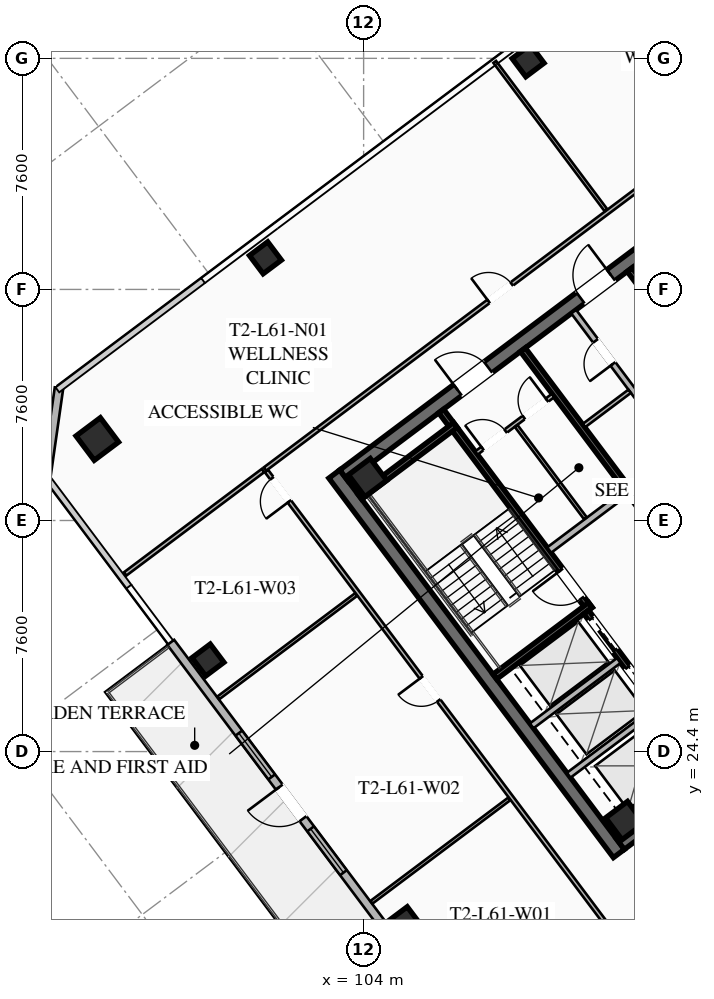
"""IFC4 building model, lengths in metres.
Left out: names, types, materials, properties, quantities, classifications, styles, units other than length and angle.
Written with IfcOpenShell. Run it as: python <this file> out.ifc"""

import sys

from ifc_helpers import new_model, si_unit, direction, frame, frame_2d, origin, origin_2d, place, context, subcontext, project, spatial, rectangle, hollow_rectangle, extrude, element, fill, save


model = new_model("IFC4")
c1 = context("Model", 3, precision=1e-05, world=origin(), true_north=direction((0.0, 1.0)))
c2 = subcontext(c1, "Body", "Model", "MODEL_VIEW")
j1 = project(units=[si_unit("LENGTHUNIT", "METRE"), si_unit("PLANEANGLEUNIT", "RADIAN")], contexts=[c1])
p1 = place(None, origin())
s1 = spatial("IfcSite", under=j1, at=p1, CompositionType="ELEMENT")
p2 = place(p1, origin())
s2 = spatial("IfcBuilding", under=s1, at=p2, CompositionType="ELEMENT")
p3 = place(p2, frame((0.0, 0.0, 225.5)))
s3 = spatial("IfcBuildingStorey", under=s2, at=p3, CompositionType="ELEMENT", Elevation=225.5)
p4 = place(p3, frame((112.396, 21.047, 0.0), z_axis=(0.0, 0.0, 1.0), x_axis=(-0.600005007985, 0.799996243986, 0.0)))
e1 = element("IfcWall", 1, at=p4, inside=s3, PredefinedType="SHEAR", context=c2, shape_type="SweptSolid", body=[
    extrude(rectangle(XDim=15.6, YDim=0.45, at=frame_2d((7.8, 0.0))), origin(), (0.0, 0.0, 1.0), 3.55),
])
p5 = place(p3, frame((124.649, 30.518, 0.0), z_axis=(0.0, 0.0, 1.0), x_axis=(-0.8, -0.6, 0.0)))
e2 = element("IfcWall", 2, at=p5, inside=s3, PredefinedType="SHEAR", context=c2, shape_type="SweptSolid", body=[
    extrude(rectangle(XDim=15.26, YDim=0.45, at=frame_2d((7.63, 0.0))), origin(), (0.0, 0.0, 1.0), 3.55),
])
p6 = place(p5, frame((9.33, 0.0, 0.0)))
e3 = element("IfcOpeningElement", 3, at=p6, cuts=e2, PredefinedType="OPENING", context=c2, shape_type="SweptSolid", body=[
    extrude(rectangle(XDim=1.25, YDim=2.25, at=frame_2d((0.625, 1.125))), frame((0.0, 0.235, 0.0), z_axis=(0.0, -1.0, 0.0), x_axis=(1.0, 0.0, 0.0)), (0.0, 0.0, 1.0), 0.47),
])
p7 = place(p5, frame((4.28, 0.0, 0.0)))
e4 = element("IfcOpeningElement", 4, at=p7, cuts=e2, PredefinedType="OPENING", context=c2, shape_type="SweptSolid", body=[
    extrude(rectangle(XDim=1.25, YDim=2.25, at=frame_2d((0.625, 1.125))), frame((0.0, 0.235, 0.0), z_axis=(0.0, -1.0, 0.0), x_axis=(1.0, 0.0, 0.0)), (0.0, 0.0, 1.0), 0.47),
])
p8 = place(p3, frame((103.351, 33.482, 0.0), z_axis=(0.0, 0.0, 1.0), x_axis=(0.8, 0.6, 0.0)))
e5 = element("IfcWall", 5, at=p8, inside=s3, PredefinedType="SHEAR", context=c2, shape_type="SweptSolid", body=[
    extrude(rectangle(XDim=15.26, YDim=0.45, at=frame_2d((7.63, 0.0))), origin(), (0.0, 0.0, 1.0), 3.55),
])
p9 = place(p8, frame((4.68, 0.0, 0.0)))
e6 = element("IfcOpeningElement", 6, at=p9, cuts=e5, PredefinedType="OPENING", context=c2, shape_type="SweptSolid", body=[
    extrude(rectangle(XDim=1.25, YDim=2.25, at=frame_2d((0.625, 1.125))), frame((0.0, 0.235, 0.0), z_axis=(0.0, -1.0, 0.0), x_axis=(1.0, 0.0, 0.0)), (0.0, 0.0, 1.0), 0.47),
])
p10 = place(p8, frame((9.73, 0.0, 0.0)))
e7 = element("IfcOpeningElement", 7, at=p10, cuts=e5, PredefinedType="OPENING", context=c2, shape_type="SweptSolid", body=[
    extrude(rectangle(XDim=1.25, YDim=2.25, at=frame_2d((0.625, 1.125))), frame((0.0, 0.235, 0.0), z_axis=(0.0, -1.0, 0.0), x_axis=(1.0, 0.0, 0.0)), (0.0, 0.0, 1.0), 0.47),
])
for number, where, z_axis, x_axis in (
    (8, (112.59, 22.13, 0.0), (0.0, 0.0, 1.0), (0.8, 0.6, 0.0)),
    (9, (104.13, 33.41, 0.0), (0.0, 0.0, 1.0), (0.8, 0.6, 0.0)),
):
    element("IfcColumn", number, at=place(p3, frame(where, z_axis=z_axis, x_axis=x_axis)), inside=s3, PredefinedType="COLUMN", context=c2, shape_type="SweptSolid", body=[
        extrude(hollow_rectangle(XDim=0.9, YDim=0.9, WallThickness=0.04, at=origin_2d()), origin(), (0.0, 0.0, 1.0), 3.37),
    ])
p11 = place(p3, frame((95.24, 34.68, 0.0), z_axis=(0.0, 0.0, 1.0), x_axis=(0.799999996291, 0.600000004945, 0.0)))
e10 = element("IfcColumn", 10, at=p11, inside=s3, PredefinedType="COLUMN", context=c2, shape_type="SweptSolid", body=[
    extrude(hollow_rectangle(XDim=1.0, YDim=1.0, WallThickness=0.04, at=origin_2d()), origin(), (0.0, 0.0, 1.0), 3.37),
])
for number, where, z_axis, x_axis in (
    (11, (109.41, 47.12, 0.0), (0.0, 0.0, 1.0), (0.8, 0.6, 0.0)),
    (12, (100.77, 40.64, 0.0), (0.0, 0.0, 1.0), (0.8, 0.6, 0.0)),
    (13, (98.88, 27.41, 0.0), (0.0, 0.0, 1.0), (0.8, 0.6, 0.0)),
    (14, (105.36, 18.77, 0.0), (0.0, 0.0, 1.0), (0.8, 0.6, 0.0)),
):
    element("IfcColumn", number, at=place(p3, frame(where, z_axis=z_axis, x_axis=x_axis)), inside=s3, PredefinedType="COLUMN", context=c2, shape_type="SweptSolid", body=[
        extrude(hollow_rectangle(XDim=0.75, YDim=0.75, WallThickness=0.032, at=origin_2d()), origin(), (0.0, 0.0, 1.0), 3.37),
    ])
p12 = place(p3, frame((105.576, 17.432, 0.0), z_axis=(0.0, 0.0, 1.0), x_axis=(-0.599994081423, 0.800004438899, 0.0)))
e15 = element("IfcWall", 15, at=p12, inside=s3, PredefinedType="SOLIDWALL", context=c2, shape_type="SweptSolid", body=[
    extrude(rectangle(XDim=13.2, YDim=0.28, at=frame_2d((6.6, 0.0))), origin(), (0.0, 0.0, 1.0), 3.37),
])
p13 = place(p12, frame((5.95, 0.0, 0.0)))
e16 = element("IfcOpeningElement", 16, at=p13, cuts=e15, PredefinedType="OPENING", context=c2, shape_type="SweptSolid", body=[
    extrude(rectangle(XDim=1.3, YDim=2.15, at=frame_2d((0.65, 1.075))), frame((0.0, 0.15, 0.0), z_axis=(0.0, -1.0, 0.0), x_axis=(1.0, 0.0, 0.0)), (0.0, 0.0, 1.0), 0.3),
])
p14 = place(p12, frame((3.732, 0.0, 0.85)))
e17 = element("IfcOpeningElement", 17, at=p14, cuts=e15, PredefinedType="OPENING", context=c2, shape_type="SweptSolid", body=[
    extrude(rectangle(XDim=1.8, YDim=1.92, at=frame_2d((0.9, 0.96))), frame((0.0, 0.15, 0.0), z_axis=(0.0, -1.0, 0.0), x_axis=(1.0, 0.0, 0.0)), (0.0, 0.0, 1.0), 0.3),
])
p15 = place(p12, frame((7.668, 0.0, 0.85)))
e18 = element("IfcOpeningElement", 18, at=p15, cuts=e15, PredefinedType="OPENING", context=c2, shape_type="SweptSolid", body=[
    extrude(rectangle(XDim=1.8, YDim=1.92, at=frame_2d((0.9, 0.96))), frame((0.0, 0.15, 0.0), z_axis=(0.0, -1.0, 0.0), x_axis=(1.0, 0.0, 0.0)), (0.0, 0.0, 1.0), 0.3),
])
p16 = place(p3, frame((93.56, 33.42, 0.0), z_axis=(0.0, 0.0, 1.0), x_axis=(0.14138683146, 0.989954425158, 0.0)))
e19 = element("IfcWall", 19, at=p16, inside=s3, PredefinedType="SOLIDWALL", context=c2, shape_type="SweptSolid", body=[
    extrude(rectangle(XDim=2.97, YDim=0.28, at=frame_2d((1.485, 0.0))), origin(), (0.0, 0.0, 1.0), 3.37),
])
p17 = place(p3, frame((111.44, 29.08, 0.0), z_axis=(0.0, 0.0, 1.0), x_axis=(-0.59999041401, 0.800007189403, 0.0)))
e20 = element("IfcWall", 20, at=p17, inside=s3, PredefinedType="SHEAR", context=c2, shape_type="SweptSolid", body=[
    extrude(rectangle(XDim=8.15, YDim=0.2, at=frame_2d((4.075, 0.0))), origin(), (0.0, 0.0, 1.0), 3.37),
])
p18 = place(p17, frame((0.45, 0.0, 0.0)))
e21 = element("IfcOpeningElement", 21, at=p18, cuts=e20, PredefinedType="OPENING", context=c2, shape_type="SweptSolid", body=[
    extrude(rectangle(XDim=1.15, YDim=2.2, at=frame_2d((0.575, 1.1))), frame((0.0, 0.11, 0.0), z_axis=(0.0, -1.0, 0.0), x_axis=(1.0, 0.0, 0.0)), (0.0, 0.0, 1.0), 0.22),
])
for number, where, z_axis, x_axis in (
    (22, (108.316, 26.862, 0.0), (0.0, 0.0, 1.0), (0.8, 0.6, 0.0)),
    (23, (103.876, 32.782, 0.0), (0.0, 0.0, 1.0), (0.8, 0.6, 0.0)),
):
    element("IfcWall", number, at=place(p3, frame(where, z_axis=z_axis, x_axis=x_axis)), inside=s3, PredefinedType="SHEAR", context=c2, shape_type="SweptSolid", body=[
        extrude(rectangle(XDim=3.93, YDim=0.2, at=frame_2d((1.965, 0.0))), origin(), (0.0, 0.0, 1.0), 3.37),
    ])
p19 = place(p3, frame((118.058, 25.856, 0.0), z_axis=(0.0, 0.0, 1.0), x_axis=(-0.600002657301, 0.799998007018, 0.0)))
e24 = element("IfcWall", 24, at=p19, inside=s3, PredefinedType="SHEAR", context=c2, shape_type="SweptSolid", body=[
    extrude(rectangle(XDim=14.7, YDim=0.2, at=frame_2d((7.35, 0.0))), origin(), (0.0, 0.0, 1.0), 3.37),
])
p20 = place(p3, frame((110.104, 31.028, 0.0), z_axis=(0.0, 0.0, 1.0), x_axis=(0.800018601094, 0.59997519774, 0.0)))
e25 = element("IfcWall", 25, at=p20, inside=s3, PredefinedType="SOLIDWALL", context=c2, shape_type="SweptSolid", body=[
    extrude(rectangle(XDim=3.15, YDim=0.22, at=frame_2d((1.575, 0.0))), origin(), (0.0, 0.0, 1.0), 2.723),
])
p21 = place(p3, frame((115.25, 23.75, 0.0), z_axis=(0.0, 0.0, 1.0), x_axis=(-0.599994036198, 0.800004472816, 0.0)))
e26 = element("IfcWall", 26, at=p21, inside=s3, PredefinedType="SHEAR", context=c2, shape_type="SweptSolid", body=[
    extrude(rectangle(XDim=6.55, YDim=0.2, at=frame_2d((3.275, 0.0))), origin(), (0.0, 0.0, 1.0), 3.37),
])
p22 = place(p21, frame((4.975, 0.0, 0.0)))
e27 = element("IfcOpeningElement", 27, at=p22, cuts=e26, PredefinedType="OPENING", context=c2, shape_type="SweptSolid", body=[
    extrude(rectangle(XDim=1.3, YDim=2.25, at=frame_2d((0.65, 1.125))), frame((0.0, 0.11, 0.0), z_axis=(0.0, -1.0, 0.0), x_axis=(1.0, 0.0, 0.0)), (0.0, 0.0, 1.0), 0.22),
])
p23 = place(p21, frame((2.975, 0.0, 0.0)))
e28 = element("IfcOpeningElement", 28, at=p23, cuts=e26, PredefinedType="OPENING", context=c2, shape_type="SweptSolid", body=[
    extrude(rectangle(XDim=1.3, YDim=2.25, at=frame_2d((0.65, 1.125))), frame((0.0, 0.11, 0.0), z_axis=(0.0, -1.0, 0.0), x_axis=(1.0, 0.0, 0.0)), (0.0, 0.0, 1.0), 0.22),
])
p24 = place(p21, frame((0.775, 0.0, 0.0)))
e29 = element("IfcOpeningElement", 29, at=p24, cuts=e26, PredefinedType="OPENING", context=c2, shape_type="SweptSolid", body=[
    extrude(rectangle(XDim=1.3, YDim=2.25, at=frame_2d((0.65, 1.125))), frame((0.0, 0.11, 0.0), z_axis=(0.0, -1.0, 0.0), x_axis=(1.0, 0.0, 0.0)), (0.0, 0.0, 1.0), 0.22),
])
for number, where, z_axis, x_axis in (
    (30, (110.746, 23.622, 0.0), (0.0, 0.0, 1.0), (0.8, 0.6, 0.0)),
    (31, (109.528, 25.246, 0.0), (0.0, 0.0, 1.0), (0.8, 0.6, 0.0)),
):
    element("IfcWall", number, at=place(p3, frame(where, z_axis=z_axis, x_axis=x_axis)), inside=s3, PredefinedType="SOLIDWALL", context=c2, shape_type="SweptSolid", body=[
        extrude(rectangle(XDim=3.58, YDim=0.2, at=frame_2d((1.79, 0.0))), origin(), (0.0, 0.0, 1.0), 3.37),
    ])
p25 = place(p3, frame((112.75, 40.25, 0.0), z_axis=(0.0, 0.0, 1.0), x_axis=(0.599994036198, -0.800004472816, 0.0)))
e32 = element("IfcWall", 32, at=p25, inside=s3, PredefinedType="SHEAR", context=c2, shape_type="SweptSolid", body=[
    extrude(rectangle(XDim=6.55, YDim=0.2, at=frame_2d((3.275, 0.0))), origin(), (0.0, 0.0, 1.0), 3.37),
])
p26 = place(p25, frame((5.075, 0.0, 0.0)))
e33 = element("IfcOpeningElement", 33, at=p26, cuts=e32, PredefinedType="OPENING", context=c2, shape_type="SweptSolid", body=[
    extrude(rectangle(XDim=1.1, YDim=2.2, at=frame_2d((0.55, 1.1))), frame((0.0, 0.11, 0.0), z_axis=(0.0, -1.0, 0.0), x_axis=(1.0, 0.0, 0.0)), (0.0, 0.0, 1.0), 0.22),
])
p27 = place(p25, frame((3.025, 0.0, 0.0)))
e34 = element("IfcOpeningElement", 34, at=p27, cuts=e32, PredefinedType="OPENING", context=c2, shape_type="SweptSolid", body=[
    extrude(rectangle(XDim=1.1, YDim=2.2, at=frame_2d((0.55, 1.1))), frame((0.0, 0.11, 0.0), z_axis=(0.0, -1.0, 0.0), x_axis=(1.0, 0.0, 0.0)), (0.0, 0.0, 1.0), 0.22),
])
p28 = place(p25, frame((1.025, 0.0, 0.0)))
e35 = element("IfcOpeningElement", 35, at=p28, cuts=e32, PredefinedType="OPENING", context=c2, shape_type="SweptSolid", body=[
    extrude(rectangle(XDim=1.1, YDim=2.2, at=frame_2d((0.55, 1.1))), frame((0.0, 0.11, 0.0), z_axis=(0.0, -1.0, 0.0), x_axis=(1.0, 0.0, 0.0)), (0.0, 0.0, 1.0), 0.22),
])
p29 = place(p3, frame((107.71, 34.22, 0.0), z_axis=(0.0, 0.0, 1.0), x_axis=(0.799981399002, 0.60002480053, 0.0)))
e36 = element("IfcWall", 36, at=p29, inside=s3, PredefinedType="PARTITIONING", context=c2, shape_type="SweptSolid", body=[
    extrude(rectangle(XDim=3.15, YDim=0.135, at=frame_2d((1.575, 0.0))), origin(), (0.0, 0.0, 1.0), 2.723),
])
p30 = place(p29, frame((0.25, 0.0, 0.0)))
e37 = element("IfcOpeningElement", 37, at=p30, cuts=e36, PredefinedType="OPENING", context=c2, shape_type="SweptSolid", body=[
    extrude(rectangle(XDim=0.95, YDim=2.05, at=frame_2d((0.475, 1.025))), frame((0.0, 0.077, 0.0), z_axis=(0.0, -1.0, 0.0), x_axis=(1.0, 0.0, 0.0)), (0.0, 0.0, 1.0), 0.155),
])
p31 = place(p29, frame((1.95, 0.0, 0.0)))
e38 = element("IfcOpeningElement", 38, at=p31, cuts=e36, PredefinedType="OPENING", context=c2, shape_type="SweptSolid", body=[
    extrude(rectangle(XDim=0.95, YDim=2.05, at=frame_2d((0.475, 1.025))), frame((0.0, 0.077, 0.0), z_axis=(0.0, -1.0, 0.0), x_axis=(1.0, 0.0, 0.0)), (0.0, 0.0, 1.0), 0.155),
])
p32 = place(p3, frame((111.296, 32.072, 0.0), z_axis=(0.0, 0.0, 1.0), x_axis=(-0.59995887973, 0.800030838552, 0.0)))
e39 = element("IfcWall", 39, at=p32, inside=s3, PredefinedType="PARTITIONING", context=c2, shape_type="SweptSolid", body=[
    extrude(rectangle(XDim=3.8, YDim=0.11, at=frame_2d((1.9, 0.0))), origin(), (0.0, 0.0, 1.0), 2.723),
])
p33 = place(p3, frame((115.11, 33.27, 0.0), z_axis=(0.0, 0.0, 1.0), x_axis=(-0.600011160345, 0.79999162962, 0.0)))
e40 = element("IfcWall", 40, at=p33, inside=s3, PredefinedType="SOLIDWALL", context=c2, shape_type="SweptSolid", body=[
    extrude(rectangle(XDim=7.0, YDim=0.2, at=frame_2d((3.5, 0.0))), origin(), (0.0, 0.0, 1.0), 2.723),
])
p34 = place(p33, frame((0.85, 0.0, 0.0)))
e41 = element("IfcOpeningElement", 41, at=p34, cuts=e40, PredefinedType="OPENING", context=c2, shape_type="SweptSolid", body=[
    extrude(rectangle(XDim=0.95, YDim=2.05, at=frame_2d((0.475, 1.025))), frame((0.0, 0.11, 0.0), z_axis=(0.0, -1.0, 0.0), x_axis=(1.0, 0.0, 0.0)), (0.0, 0.0, 1.0), 0.22),
])
p35 = place(p33, frame((4.85, 0.0, 0.0)))
e42 = element("IfcOpeningElement", 42, at=p35, cuts=e40, PredefinedType="OPENING", context=c2, shape_type="SweptSolid", body=[
    extrude(rectangle(XDim=0.95, YDim=2.05, at=frame_2d((0.475, 1.025))), frame((0.0, 0.11, 0.0), z_axis=(0.0, -1.0, 0.0), x_axis=(1.0, 0.0, 0.0)), (0.0, 0.0, 1.0), 0.22),
])
p36 = place(p3, frame((111.246, 35.122, 0.0), z_axis=(0.0, 0.0, 1.0), x_axis=(0.8, 0.6, 0.0)))
e43 = element("IfcWall", 43, at=p36, inside=s3, PredefinedType="PARTITIONING", context=c2, shape_type="SweptSolid", body=[
    extrude(rectangle(XDim=1.88, YDim=0.135, at=frame_2d((0.94, 0.0))), origin(), (0.0, 0.0, 1.0), 2.723),
])
p37 = place(p3, frame((100.756, 33.692, 0.0), z_axis=(0.0, 0.0, 1.0), x_axis=(0.799998716732, 0.60000171102, 0.0)))
e44 = element("IfcWall", 44, at=p37, inside=s3, PredefinedType="PARTITIONING", context=c2, shape_type="SweptSolid", body=[
    extrude(rectangle(XDim=22.83, YDim=0.135, at=frame_2d((11.415, 0.0))), origin(), (0.0, 0.0, 1.0), 2.723),
])
p38 = place(p37, frame((9.193, 0.0, 0.0)))
e45 = element("IfcOpeningElement", 45, at=p38, cuts=e44, PredefinedType="OPENING", context=c2, shape_type="SweptSolid", body=[
    extrude(rectangle(XDim=0.95, YDim=2.05, at=frame_2d((0.475, 1.025))), frame((0.0, 0.077, 0.0), z_axis=(0.0, -1.0, 0.0), x_axis=(1.0, 0.0, 0.0)), (0.0, 0.0, 1.0), 0.155),
])
p39 = place(p37, frame((21.58, 0.0, 0.0)))
e46 = element("IfcOpeningElement", 46, at=p39, cuts=e44, PredefinedType="OPENING", context=c2, shape_type="SweptSolid", body=[
    extrude(rectangle(XDim=0.95, YDim=2.05, at=frame_2d((0.475, 1.025))), frame((0.0, 0.077, 0.0), z_axis=(0.0, -1.0, 0.0), x_axis=(1.0, 0.0, 0.0)), (0.0, 0.0, 1.0), 0.155),
])
p40 = place(p3, frame((111.972, 42.204, 0.0), z_axis=(0.0, 0.0, 1.0), x_axis=(-0.6, 0.8, 0.0)))
e47 = element("IfcWall", 47, at=p40, inside=s3, PredefinedType="PARTITIONING", context=c2, shape_type="SweptSolid", body=[
    extrude(rectangle(XDim=6.1, YDim=0.11, at=frame_2d((3.05, 0.0))), origin(), (0.0, 0.0, 1.0), 2.723),
])
p41 = place(p3, frame((113.23, 17.06, 0.0), z_axis=(0.0, 0.0, 1.0), x_axis=(-0.600003772342, 0.79999717073, 0.0)))
e48 = element("IfcWall", 48, at=p41, inside=s3, PredefinedType="PARTITIONING", context=c2, shape_type="SweptSolid", body=[
    extrude(rectangle(XDim=20.71, YDim=0.135, at=frame_2d((10.355, 0.0))), origin(), (0.0, 0.0, 1.0), 2.723),
])
p42 = place(p41, frame((0.3, 0.0, 0.0)))
e49 = element("IfcOpeningElement", 49, at=p42, cuts=e48, PredefinedType="OPENING", context=c2, shape_type="SweptSolid", body=[
    extrude(rectangle(XDim=0.95, YDim=2.05, at=frame_2d((0.475, 1.025))), frame((0.0, 0.077, 0.0), z_axis=(0.0, -1.0, 0.0), x_axis=(1.0, 0.0, 0.0)), (0.0, 0.0, 1.0), 0.155),
])
p43 = place(p41, frame((11.272, 0.0, 0.0)))
e50 = element("IfcOpeningElement", 50, at=p43, cuts=e48, PredefinedType="OPENING", context=c2, shape_type="SweptSolid", body=[
    extrude(rectangle(XDim=0.95, YDim=2.05, at=frame_2d((0.475, 1.025))), frame((0.0, 0.077, 0.0), z_axis=(0.0, -1.0, 0.0), x_axis=(1.0, 0.0, 0.0)), (0.0, 0.0, 1.0), 0.155),
])
p44 = place(p41, frame((19.46, 0.0, 0.0)))
e51 = element("IfcOpeningElement", 51, at=p44, cuts=e48, PredefinedType="OPENING", context=c2, shape_type="SweptSolid", body=[
    extrude(rectangle(XDim=0.95, YDim=2.05, at=frame_2d((0.475, 1.025))), frame((0.0, 0.077, 0.0), z_axis=(0.0, -1.0, 0.0), x_axis=(1.0, 0.0, 0.0)), (0.0, 0.0, 1.0), 0.155),
])
p45 = place(p3, frame((100.692, 33.644, 0.0), z_axis=(0.0, 0.0, 1.0), x_axis=(-0.799984498661, -0.600020667896, 0.0)))
e52 = element("IfcWall", 52, at=p45, inside=s3, PredefinedType="PARTITIONING", context=c2, shape_type="SweptSolid", body=[
    extrude(rectangle(XDim=5.67, YDim=0.135, at=frame_2d((2.835, 0.0))), origin(), (0.0, 0.0, 1.0), 2.723),
])
for number, where, z_axis, x_axis in (
    (53, (104.256, 19.442, 0.0), (0.0, 0.0, 1.0), (0.8, 0.6, 0.0)),
    (54, (99.216, 26.162, 0.0), (0.0, 0.0, 1.0), (0.8, 0.6, 0.0)),
):
    element("IfcWall", number, at=place(p3, frame(where, z_axis=z_axis, x_axis=x_axis)), inside=s3, PredefinedType="PARTITIONING", context=c2, shape_type="SweptSolid", body=[
        extrude(rectangle(XDim=5.67, YDim=0.11, at=frame_2d((2.835, 0.0))), origin(), (0.0, 0.0, 1.0), 2.723),
    ])
p46 = place(p13, origin())
e55 = element("IfcDoor", 55, at=p46, inside=s3, OperationType="SINGLE_SWING_RIGHT", PredefinedType="DOOR", context=c2, shape_type="SweptSolid", body=[
    extrude(rectangle(XDim=1.3, YDim=2.15, at=frame_2d((0.65, 1.075))), frame((0.0, 0.025, 0.0), z_axis=(0.0, -1.0, 0.0), x_axis=(1.0, 0.0, 0.0)), (0.0, 0.0, 1.0), 0.05),
])
fill(e16, e55)
p47 = place(p14, origin())
e56 = element("IfcWindow", 56, at=p47, inside=s3, PartitioningType="SINGLE_PANEL", PredefinedType="WINDOW", context=c2, shape_type="SweptSolid", body=[
    extrude(rectangle(XDim=1.8, YDim=1.92, at=frame_2d((0.9, 0.96))), frame((0.0, 0.03, 0.0), z_axis=(0.0, -1.0, 0.0), x_axis=(1.0, 0.0, 0.0)), (0.0, 0.0, 1.0), 0.06),
])
fill(e17, e56)
p48 = place(p15, origin())
e57 = element("IfcWindow", 57, at=p48, inside=s3, PartitioningType="SINGLE_PANEL", PredefinedType="WINDOW", context=c2, shape_type="SweptSolid", body=[
    extrude(rectangle(XDim=1.8, YDim=1.92, at=frame_2d((0.9, 0.96))), frame((0.0, 0.03, 0.0), z_axis=(0.0, -1.0, 0.0), x_axis=(1.0, 0.0, 0.0)), (0.0, 0.0, 1.0), 0.06),
])
fill(e18, e57)
p49 = place(p9, origin())
e58 = element("IfcDoor", 58, at=p49, inside=s3, OperationType="SINGLE_SWING_LEFT", PredefinedType="DOOR", context=c2, shape_type="SweptSolid", body=[
    extrude(rectangle(XDim=1.25, YDim=2.25, at=frame_2d((0.625, 1.125))), frame((0.0, 0.025, 0.0), z_axis=(0.0, -1.0, 0.0), x_axis=(1.0, 0.0, 0.0)), (0.0, 0.0, 1.0), 0.05),
])
fill(e6, e58)
p50 = place(p10, origin())
e59 = element("IfcDoor", 59, at=p50, inside=s3, OperationType="SINGLE_SWING_RIGHT", PredefinedType="DOOR", context=c2, shape_type="SweptSolid", body=[
    extrude(rectangle(XDim=1.25, YDim=2.25, at=frame_2d((0.625, 1.125))), frame((0.0, 0.025, 0.0), z_axis=(0.0, -1.0, 0.0), x_axis=(1.0, 0.0, 0.0)), (0.0, 0.0, 1.0), 0.05),
])
fill(e7, e59)
p51 = place(p18, origin())
e60 = element("IfcDoor", 60, at=p51, inside=s3, OperationType="SINGLE_SWING_RIGHT", PredefinedType="DOOR", context=c2, shape_type="SweptSolid", body=[
    extrude(rectangle(XDim=1.15, YDim=2.2, at=frame_2d((0.575, 1.1))), frame((0.0, 0.025, 0.0), z_axis=(0.0, -1.0, 0.0), x_axis=(1.0, 0.0, 0.0)), (0.0, 0.0, 1.0), 0.05),
])
fill(e21, e60)
p52 = place(p30, origin())
e61 = element("IfcDoor", 61, at=p52, inside=s3, OperationType="SINGLE_SWING_LEFT", PredefinedType="DOOR", context=c2, shape_type="SweptSolid", body=[
    extrude(rectangle(XDim=0.95, YDim=2.05, at=frame_2d((0.475, 1.025))), frame((0.0, 0.025, 0.0), z_axis=(0.0, -1.0, 0.0), x_axis=(1.0, 0.0, 0.0)), (0.0, 0.0, 1.0), 0.05),
])
fill(e37, e61)
p53 = place(p31, origin())
e62 = element("IfcDoor", 62, at=p53, inside=s3, OperationType="SINGLE_SWING_RIGHT", PredefinedType="DOOR", context=c2, shape_type="SweptSolid", body=[
    extrude(rectangle(XDim=0.95, YDim=2.05, at=frame_2d((0.475, 1.025))), frame((0.0, 0.025, 0.0), z_axis=(0.0, -1.0, 0.0), x_axis=(1.0, 0.0, 0.0)), (0.0, 0.0, 1.0), 0.05),
])
fill(e38, e62)
p54 = place(p35, origin())
e63 = element("IfcDoor", 63, at=p54, inside=s3, OperationType="SINGLE_SWING_LEFT", PredefinedType="DOOR", context=c2, shape_type="SweptSolid", body=[
    extrude(rectangle(XDim=0.95, YDim=2.05, at=frame_2d((0.475, 1.025))), frame((0.0, 0.025, 0.0), z_axis=(0.0, -1.0, 0.0), x_axis=(1.0, 0.0, 0.0)), (0.0, 0.0, 1.0), 0.05),
])
fill(e42, e63)
p55 = place(p38, origin())
e64 = element("IfcDoor", 64, at=p55, inside=s3, OperationType="SINGLE_SWING_LEFT", PredefinedType="DOOR", context=c2, shape_type="SweptSolid", body=[
    extrude(rectangle(XDim=0.95, YDim=2.05, at=frame_2d((0.475, 1.025))), frame((0.0, 0.025, 0.0), z_axis=(0.0, -1.0, 0.0), x_axis=(1.0, 0.0, 0.0)), (0.0, 0.0, 1.0), 0.05),
])
fill(e45, e64)
p56 = place(p43, origin())
e65 = element("IfcDoor", 65, at=p56, inside=s3, OperationType="SINGLE_SWING_RIGHT", PredefinedType="DOOR", context=c2, shape_type="SweptSolid", body=[
    extrude(rectangle(XDim=0.95, YDim=2.05, at=frame_2d((0.475, 1.025))), frame((0.0, 0.025, 0.0), z_axis=(0.0, -1.0, 0.0), x_axis=(1.0, 0.0, 0.0)), (0.0, 0.0, 1.0), 0.05),
])
fill(e50, e65)
p57 = place(p44, origin())
e66 = element("IfcDoor", 66, at=p57, inside=s3, OperationType="SINGLE_SWING_LEFT", PredefinedType="DOOR", context=c2, shape_type="SweptSolid", body=[
    extrude(rectangle(XDim=0.95, YDim=2.05, at=frame_2d((0.475, 1.025))), frame((0.0, 0.025, 0.0), z_axis=(0.0, -1.0, 0.0), x_axis=(1.0, 0.0, 0.0)), (0.0, 0.0, 1.0), 0.05),
])
fill(e51, e66)
p58 = place(p22, origin())
e67 = element("IfcDoor", 67, at=p58, inside=s3, OperationType="SLIDING_TO_LEFT", PredefinedType="DOOR", context=c2, shape_type="SweptSolid", body=[
    extrude(rectangle(XDim=1.3, YDim=2.25, at=frame_2d((0.65, 1.125))), frame((0.0, 0.025, 0.0), z_axis=(0.0, -1.0, 0.0), x_axis=(1.0, 0.0, 0.0)), (0.0, 0.0, 1.0), 0.05),
])
fill(e27, e67)
p59 = place(p23, origin())
e68 = element("IfcDoor", 68, at=p59, inside=s3, OperationType="SLIDING_TO_LEFT", PredefinedType="DOOR", context=c2, shape_type="SweptSolid", body=[
    extrude(rectangle(XDim=1.3, YDim=2.25, at=frame_2d((0.65, 1.125))), frame((0.0, 0.025, 0.0), z_axis=(0.0, -1.0, 0.0), x_axis=(1.0, 0.0, 0.0)), (0.0, 0.0, 1.0), 0.05),
])
fill(e28, e68)
save(model, sys.argv[1])
